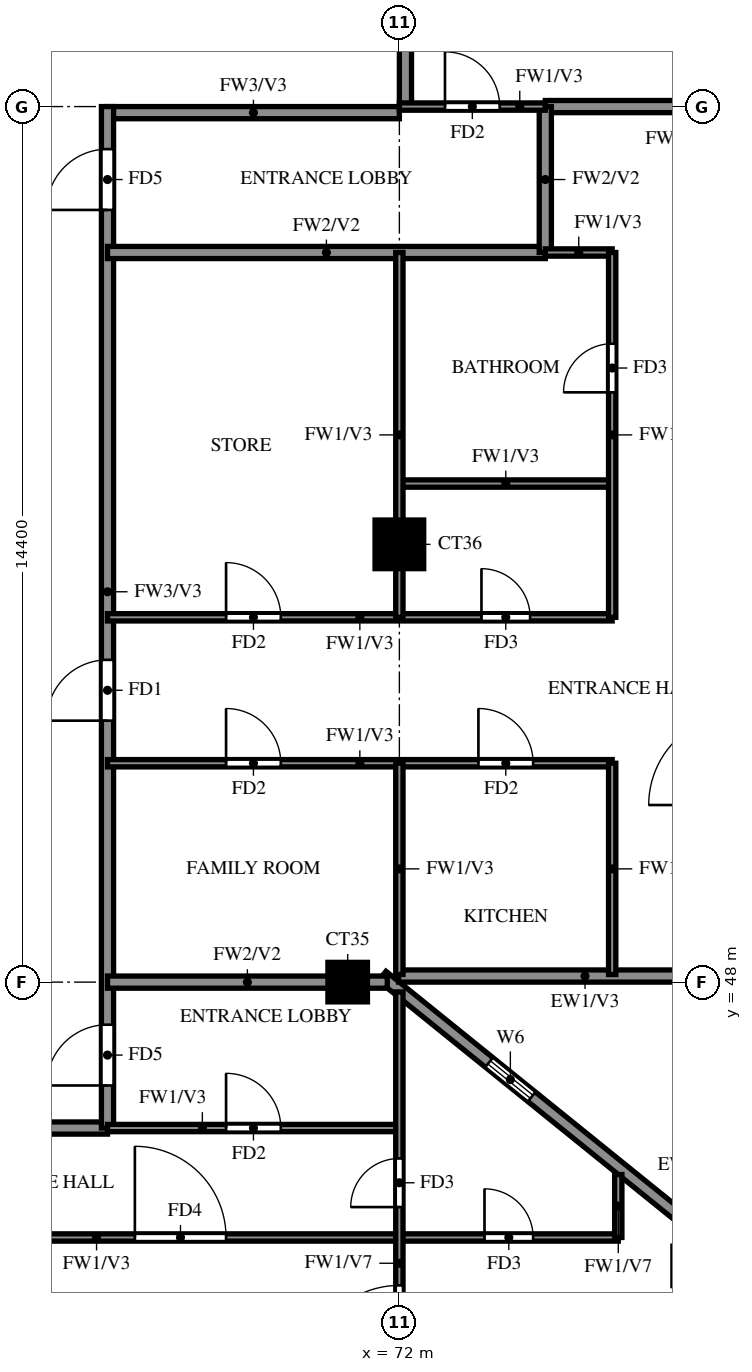
"""IFC4 building model, lengths in metres.
Left out: names, types, materials, properties, quantities, classifications, styles, units other than length and angle.
Written with IfcOpenShell. Run it as: python <this file> out.ifc"""

import sys

from ifc_helpers import new_model, si_unit, direction, frame, frame_2d, origin, origin_2d, place, context, subcontext, project, spatial, rectangle, extrude, source, transform, mapped, element, fill, save


model = new_model("IFC4")
c1 = context("Model", 3, precision=1e-05, world=origin(), true_north=direction((0.0, 1.0)))
c2 = subcontext(c1, "Body", "Model", "MODEL_VIEW")
j1 = project(units=[si_unit("LENGTHUNIT", "METRE"), si_unit("PLANEANGLEUNIT", "RADIAN")], contexts=[c1])
p1 = place(None, origin())
s1 = spatial("IfcSite", under=j1, at=p1, CompositionType="ELEMENT")
p2 = place(p1, origin())
s2 = spatial("IfcBuilding", under=s1, at=p2, CompositionType="ELEMENT")
p3 = place(p2, frame((0.0, 0.0, 236.0)))
s3 = spatial("IfcBuildingStorey", under=s2, at=p3, CompositionType="ELEMENT", Elevation=236.0)
m1 = source(origin(), c2, "Body", "SweptSolid", [
    extrude(rectangle(XDim=0.65, YDim=0.65, at=origin_2d()), origin(), (0.0, 0.0, 1.0), 3.22),
])
for number, where, z_axis, x_axis in (
    (1, (76.823, 43.333, 0.0), (0.0, 0.0, 1.0), (1.0, 0.0, 0.0)),
    (2, (71.15, 48.0, 0.0), (0.0, 0.0, 1.0), (1.0, 0.0, 0.0)),
):
    element("IfcColumn", number, at=place(p3, frame(where, z_axis=z_axis, x_axis=x_axis)), inside=s3, PredefinedType="COLUMN", context=c2, shape_type="MappedRepresentation", body=[
        mapped(m1, transform((0.0, 0.0, 0.0))),
    ])
m2 = source(origin(), c2, "Body", "SweptSolid", [
    extrude(rectangle(XDim=0.8, YDim=0.8, at=origin_2d()), origin(), (0.0, 0.0, 1.0), 3.22),
])
p4 = place(p3, frame((72.0, 55.2, 0.0), z_axis=(0.0, 0.0, 1.0), x_axis=(1.0, 0.0, 0.0)))
e3 = element("IfcColumn", 3, at=p4, inside=s3, PredefinedType="COLUMN", context=c2, shape_type="MappedRepresentation", body=[
    mapped(m2, transform((0.0, 0.0, 0.0))),
])
p5 = place(p3, frame((81.907, 39.87, 0.0), z_axis=(0.0, 0.0, 1.0), x_axis=(-0.777936274417, 0.62834318087, 0.0)))
e4 = element("IfcWall", 4, at=p5, inside=s3, PredefinedType="SOLIDWALL", context=c2, shape_type="SweptSolid", body=[
    extrude(rectangle(XDim=13.099, YDim=0.2, at=frame_2d((6.549, 0.0))), origin(), (0.0, 0.0, 1.0), 3.22),
])
p6 = place(p5, frame((9.938, 0.0, 1.5)))
e5 = element("IfcOpeningElement", 5, at=p6, cuts=e4, PredefinedType="OPENING", context=c2, shape_type="SweptSolid", body=[
    extrude(rectangle(XDim=0.9, YDim=0.9, at=frame_2d((0.45, 0.45))), frame((0.0, 0.11, 0.0), z_axis=(0.0, -1.0, 0.0), x_axis=(1.0, 0.0, 0.0)), (0.0, 0.0, 1.0), 0.22),
])
p7 = place(p3, frame((71.987, 48.1, 0.0), z_axis=(0.0, 0.0, 1.0), x_axis=(1.0, 0.0, 0.0)))
e6 = element("IfcWall", 6, at=p7, inside=s3, PredefinedType="SOLIDWALL", context=c2, shape_type="SweptSolid", body=[
    extrude(rectangle(XDim=6.813, YDim=0.2, at=frame_2d((3.406, 0.0))), origin(), (0.0, 0.0, 1.0), 3.22),
])
p8 = place(p3, frame((60.0, 45.6, 0.0), z_axis=(0.0, 0.0, 1.0), x_axis=(1.0, 0.0, 0.0)))
e7 = element("IfcWall", 7, at=p8, inside=s3, PredefinedType="SOLIDWALL", context=c2, shape_type="SweptSolid", body=[
    extrude(rectangle(XDim=7.2, YDim=0.2, at=frame_2d((3.6, 0.0))), origin(), (0.0, 0.0, 1.0), 3.22),
])
p9 = place(p3, frame((67.2, 62.3, 0.0), z_axis=(0.0, 0.0, 1.0), x_axis=(1.0, 0.0, 0.0)))
e8 = element("IfcWall", 8, at=p9, inside=s3, PredefinedType="SOLIDWALL", context=c2, shape_type="SweptSolid", body=[
    extrude(rectangle(XDim=4.8, YDim=0.2, at=frame_2d((2.4, 0.0))), origin(), (0.0, 0.0, 1.0), 3.22),
])
p10 = place(p3, frame((67.2, 45.6, 0.0), z_axis=(0.0, 0.0, 1.0), x_axis=(0.0, 1.0, 0.0)))
e9 = element("IfcWall", 9, at=p10, inside=s3, PredefinedType="SOLIDWALL", context=c2, shape_type="SweptSolid", body=[
    extrude(rectangle(XDim=16.8, YDim=0.2, at=frame_2d((8.4, 0.0))), origin(), (0.0, 0.0, 1.0), 3.22),
])
p11 = place(p10, frame((6.7, 0.0, 0.0)))
e10 = element("IfcOpeningElement", 10, at=p11, cuts=e9, PredefinedType="OPENING", context=c2, shape_type="SweptSolid", body=[
    extrude(rectangle(XDim=1.0, YDim=2.1, at=frame_2d((0.5, 1.05))), frame((0.0, 0.11, 0.0), z_axis=(0.0, -1.0, 0.0), x_axis=(1.0, 0.0, 0.0)), (0.0, 0.0, 1.0), 0.22),
])
p12 = place(p10, frame((15.1, 0.0, 0.0)))
e11 = element("IfcOpeningElement", 11, at=p12, cuts=e9, PredefinedType="OPENING", context=c2, shape_type="SweptSolid", body=[
    extrude(rectangle(XDim=1.0, YDim=2.1, at=frame_2d((0.5, 1.05))), frame((0.0, 0.11, 0.0), z_axis=(0.0, -1.0, 0.0), x_axis=(1.0, 0.0, 0.0)), (0.0, 0.0, 1.0), 0.22),
])
p13 = place(p10, frame((0.7, 0.0, 0.0)))
e12 = element("IfcOpeningElement", 12, at=p13, cuts=e9, PredefinedType="OPENING", context=c2, shape_type="SweptSolid", body=[
    extrude(rectangle(XDim=1.0, YDim=2.1, at=frame_2d((0.5, 1.05))), frame((0.0, 0.11, 0.0), z_axis=(0.0, -1.0, 0.0), x_axis=(1.0, 0.0, 0.0)), (0.0, 0.0, 1.0), 0.22),
])
p14 = place(p3, frame((72.1, 62.4, 0.0), z_axis=(0.0, 0.0, 1.0), x_axis=(0.0, 1.0, 0.0)))
e13 = element("IfcWall", 13, at=p14, inside=s3, PredefinedType="SOLIDWALL", context=c2, shape_type="SweptSolid", body=[
    extrude(rectangle(XDim=15.6, YDim=0.2, at=frame_2d((7.8, 0.0))), origin(), (0.0, 0.0, 1.0), 3.22),
])
p15 = place(p3, frame((67.2, 48.0, 0.0), z_axis=(0.0, 0.0, 1.0), x_axis=(1.0, 0.0, 0.0)))
e14 = element("IfcWall", 14, at=p15, inside=s3, PredefinedType="SOLIDWALL", context=c2, shape_type="SweptSolid", body=[
    extrude(rectangle(XDim=4.601, YDim=0.2, at=frame_2d((2.301, 0.0))), origin(), (0.0, 0.0, 1.0), 3.22),
])
p16 = place(p3, frame((67.2, 60.0, 0.0), z_axis=(0.0, 0.0, 1.0), x_axis=(1.0, 0.0, 0.0)))
e15 = element("IfcWall", 15, at=p16, inside=s3, PredefinedType="SOLIDWALL", context=c2, shape_type="SweptSolid", body=[
    extrude(rectangle(XDim=7.2, YDim=0.2, at=frame_2d((3.6, 0.0))), origin(), (0.0, 0.0, 1.0), 3.22),
])
p17 = place(p3, frame((74.4, 62.4, 0.0), z_axis=(0.0, 0.0, 1.0), x_axis=(1.0, 0.0, 0.0)))
e16 = element("IfcWall", 16, at=p17, inside=s3, PredefinedType="SOLIDWALL", context=c2, shape_type="SweptSolid", body=[
    extrude(rectangle(XDim=7.875, YDim=0.2, at=frame_2d((3.938, 0.0))), origin(), (0.0, 0.0, 1.0), 3.22),
])
p18 = place(p3, frame((74.4, 60.0, 0.0), z_axis=(0.0, 0.0, 1.0), x_axis=(0.0, 1.0, 0.0)))
e17 = element("IfcWall", 17, at=p18, inside=s3, PredefinedType="SOLIDWALL", context=c2, shape_type="SweptSolid", body=[
    extrude(rectangle(XDim=2.4, YDim=0.2, at=frame_2d((1.2, 0.0))), origin(), (0.0, 0.0, 1.0), 3.22),
])
p19 = place(p3, frame((60.0, 43.8, 0.0), z_axis=(0.0, 0.0, 1.0), x_axis=(1.0, 0.0, 0.0)))
e18 = element("IfcWall", 18, at=p19, inside=s3, PredefinedType="PARTITIONING", context=c2, shape_type="SweptSolid", body=[
    extrude(rectangle(XDim=15.6, YDim=0.12, at=frame_2d((7.8, 0.0))), origin(), (0.0, 0.0, 1.0), 3.22),
])
p20 = place(p19, frame((7.65, 0.0, 0.0)))
e19 = element("IfcOpeningElement", 19, at=p20, cuts=e18, PredefinedType="OPENING", context=c2, shape_type="SweptSolid", body=[
    extrude(rectangle(XDim=1.5, YDim=2.1, at=frame_2d((0.75, 1.05))), frame((0.0, 0.07, 0.0), z_axis=(0.0, -1.0, 0.0), x_axis=(1.0, 0.0, 0.0)), (0.0, 0.0, 1.0), 0.14),
])
p21 = place(p19, frame((1.95, 0.0, 0.0)))
e20 = element("IfcOpeningElement", 20, at=p21, cuts=e18, PredefinedType="OPENING", context=c2, shape_type="SweptSolid", body=[
    extrude(rectangle(XDim=0.9, YDim=2.1, at=frame_2d((0.45, 1.05))), frame((0.0, 0.07, 0.0), z_axis=(0.0, -1.0, 0.0), x_axis=(1.0, 0.0, 0.0)), (0.0, 0.0, 1.0), 0.14),
])
p22 = place(p19, frame((13.4, 0.0, 0.0)))
e21 = element("IfcOpeningElement", 21, at=p22, cuts=e18, PredefinedType="OPENING", context=c2, shape_type="SweptSolid", body=[
    extrude(rectangle(XDim=0.8, YDim=2.1, at=frame_2d((0.4, 1.05))), frame((0.0, 0.07, 0.0), z_axis=(0.0, -1.0, 0.0), x_axis=(1.0, 0.0, 0.0)), (0.0, 0.0, 1.0), 0.14),
])
p23 = place(p3, frame((67.2, 45.6, 0.0), z_axis=(0.0, 0.0, 1.0), x_axis=(1.0, 0.0, 0.0)))
e22 = element("IfcWall", 22, at=p23, inside=s3, PredefinedType="PARTITIONING", context=c2, shape_type="SweptSolid", body=[
    extrude(rectangle(XDim=4.8, YDim=0.12, at=frame_2d((2.4, 0.0))), origin(), (0.0, 0.0, 1.0), 3.22),
])
p24 = place(p23, frame((1.95, 0.0, 0.0)))
e23 = element("IfcOpeningElement", 23, at=p24, cuts=e22, PredefinedType="OPENING", context=c2, shape_type="SweptSolid", body=[
    extrude(rectangle(XDim=0.9, YDim=2.1, at=frame_2d((0.45, 1.05))), frame((0.0, 0.07, 0.0), z_axis=(0.0, -1.0, 0.0), x_axis=(1.0, 0.0, 0.0)), (0.0, 0.0, 1.0), 0.14),
])
p25 = place(p3, frame((67.2, 51.6, 0.0), z_axis=(0.0, 0.0, 1.0), x_axis=(1.0, 0.0, 0.0)))
e24 = element("IfcWall", 24, at=p25, inside=s3, PredefinedType="PARTITIONING", context=c2, shape_type="SweptSolid", body=[
    extrude(rectangle(XDim=8.3, YDim=0.12, at=frame_2d((4.15, 0.0))), origin(), (0.0, 0.0, 1.0), 3.22),
])
p26 = place(p25, frame((6.1, 0.0, 0.0)))
e25 = element("IfcOpeningElement", 25, at=p26, cuts=e24, PredefinedType="OPENING", context=c2, shape_type="SweptSolid", body=[
    extrude(rectangle(XDim=0.9, YDim=2.1, at=frame_2d((0.45, 1.05))), frame((0.0, 0.07, 0.0), z_axis=(0.0, -1.0, 0.0), x_axis=(1.0, 0.0, 0.0)), (0.0, 0.0, 1.0), 0.14),
])
p27 = place(p25, frame((1.95, 0.0, 0.0)))
e26 = element("IfcOpeningElement", 26, at=p27, cuts=e24, PredefinedType="OPENING", context=c2, shape_type="SweptSolid", body=[
    extrude(rectangle(XDim=0.9, YDim=2.1, at=frame_2d((0.45, 1.05))), frame((0.0, 0.07, 0.0), z_axis=(0.0, -1.0, 0.0), x_axis=(1.0, 0.0, 0.0)), (0.0, 0.0, 1.0), 0.14),
])
p28 = place(p3, frame((67.2, 54.0, 0.0), z_axis=(0.0, 0.0, 1.0), x_axis=(1.0, 0.0, 0.0)))
e27 = element("IfcWall", 27, at=p28, inside=s3, PredefinedType="PARTITIONING", context=c2, shape_type="SweptSolid", body=[
    extrude(rectangle(XDim=8.3, YDim=0.12, at=frame_2d((4.15, 0.0))), origin(), (0.0, 0.0, 1.0), 3.22),
])
p29 = place(p28, frame((6.15, 0.0, 0.0)))
e28 = element("IfcOpeningElement", 28, at=p29, cuts=e27, PredefinedType="OPENING", context=c2, shape_type="SweptSolid", body=[
    extrude(rectangle(XDim=0.8, YDim=2.1, at=frame_2d((0.4, 1.05))), frame((0.0, 0.07, 0.0), z_axis=(0.0, -1.0, 0.0), x_axis=(1.0, 0.0, 0.0)), (0.0, 0.0, 1.0), 0.14),
])
p30 = place(p28, frame((1.95, 0.0, 0.0)))
e29 = element("IfcOpeningElement", 29, at=p30, cuts=e27, PredefinedType="OPENING", context=c2, shape_type="SweptSolid", body=[
    extrude(rectangle(XDim=0.9, YDim=2.1, at=frame_2d((0.45, 1.05))), frame((0.0, 0.07, 0.0), z_axis=(0.0, -1.0, 0.0), x_axis=(1.0, 0.0, 0.0)), (0.0, 0.0, 1.0), 0.14),
])
p31 = place(p3, frame((72.0, 56.2, 0.0), z_axis=(0.0, 0.0, 1.0), x_axis=(1.0, 0.0, 0.0)))
e30 = element("IfcWall", 30, at=p31, inside=s3, PredefinedType="PARTITIONING", context=c2, shape_type="SweptSolid", body=[
    extrude(rectangle(XDim=3.5, YDim=0.12, at=frame_2d((1.75, 0.0))), origin(), (0.0, 0.0, 1.0), 3.22),
])
p32 = place(p3, frame((74.4, 60.0, 0.0), z_axis=(0.0, 0.0, 1.0), x_axis=(1.0, 0.0, 0.0)))
e31 = element("IfcWall", 31, at=p32, inside=s3, PredefinedType="PARTITIONING", context=c2, shape_type="SweptSolid", body=[
    extrude(rectangle(XDim=1.1, YDim=0.12, at=frame_2d((0.55, 0.0))), origin(), (0.0, 0.0, 1.0), 3.22),
])
p33 = place(p3, frame((72.0, 62.4, 0.0), z_axis=(0.0, 0.0, 1.0), x_axis=(1.0, 0.0, 0.0)))
e32 = element("IfcWall", 32, at=p33, inside=s3, PredefinedType="PARTITIONING", context=c2, shape_type="SweptSolid", body=[
    extrude(rectangle(XDim=2.4, YDim=0.12, at=frame_2d((1.2, 0.0))), origin(), (0.0, 0.0, 1.0), 3.22),
])
p34 = place(p33, frame((0.75, 0.0, 0.0)))
e33 = element("IfcOpeningElement", 33, at=p34, cuts=e32, PredefinedType="OPENING", context=c2, shape_type="SweptSolid", body=[
    extrude(rectangle(XDim=0.9, YDim=2.1, at=frame_2d((0.45, 1.05))), frame((0.0, 0.07, 0.0), z_axis=(0.0, -1.0, 0.0), x_axis=(1.0, 0.0, 0.0)), (0.0, 0.0, 1.0), 0.14),
])
p35 = place(p3, frame((72.0, 39.725, 0.0), z_axis=(0.0, 0.0, 1.0), x_axis=(0.0, 1.0, 0.0)))
e34 = element("IfcWall", 34, at=p35, inside=s3, PredefinedType="PARTITIONING", context=c2, shape_type="SweptSolid", body=[
    extrude(rectangle(XDim=8.114, YDim=0.12, at=frame_2d((4.057, 0.0))), origin(), (0.0, 0.0, 1.0), 2.32),
])
p36 = place(p35, frame((1.788, 0.0, 0.0)))
e35 = element("IfcOpeningElement", 35, at=p36, cuts=e34, PredefinedType="OPENING", context=c2, shape_type="SweptSolid", body=[
    extrude(rectangle(XDim=1.5, YDim=2.1, at=frame_2d((0.75, 1.05))), frame((0.0, 0.07, 0.0), z_axis=(0.0, -1.0, 0.0), x_axis=(1.0, 0.0, 0.0)), (0.0, 0.0, 1.0), 0.14),
])
p37 = place(p35, frame((4.575, 0.0, 0.0)))
e36 = element("IfcOpeningElement", 36, at=p37, cuts=e34, PredefinedType="OPENING", context=c2, shape_type="SweptSolid", body=[
    extrude(rectangle(XDim=0.8, YDim=2.1, at=frame_2d((0.4, 1.05))), frame((0.0, 0.07, 0.0), z_axis=(0.0, -1.0, 0.0), x_axis=(1.0, 0.0, 0.0)), (0.0, 0.0, 1.0), 0.14),
])
p38 = place(p3, frame((72.0, 48.125, 0.0), z_axis=(0.0, 0.0, 1.0), x_axis=(0.0, 1.0, 0.0)))
e37 = element("IfcWall", 37, at=p38, inside=s3, PredefinedType="PARTITIONING", context=c2, shape_type="SweptSolid", body=[
    extrude(rectangle(XDim=3.475, YDim=0.12, at=frame_2d((1.738, 0.0))), origin(), (0.0, 0.0, 1.0), 3.22),
])
p39 = place(p3, frame((72.0, 54.0, 0.0), z_axis=(0.0, 0.0, 1.0), x_axis=(0.0, 1.0, 0.0)))
e38 = element("IfcWall", 38, at=p39, inside=s3, PredefinedType="PARTITIONING", context=c2, shape_type="SweptSolid", body=[
    extrude(rectangle(XDim=6.0, YDim=0.12, at=frame_2d((3.0, 0.0))), origin(), (0.0, 0.0, 1.0), 3.22),
])
p40 = place(p3, frame((75.5, 48.125, 0.0), z_axis=(0.0, 0.0, 1.0), x_axis=(0.0, 1.0, 0.0)))
e39 = element("IfcWall", 39, at=p40, inside=s3, PredefinedType="PARTITIONING", context=c2, shape_type="SweptSolid", body=[
    extrude(rectangle(XDim=3.475, YDim=0.12, at=frame_2d((1.738, 0.0))), origin(), (0.0, 0.0, 1.0), 3.22),
])
p41 = place(p3, frame((75.5, 54.0, 0.0), z_axis=(0.0, 0.0, 1.0), x_axis=(0.0, 1.0, 0.0)))
e40 = element("IfcWall", 40, at=p41, inside=s3, PredefinedType="PARTITIONING", context=c2, shape_type="SweptSolid", body=[
    extrude(rectangle(XDim=6.0, YDim=0.12, at=frame_2d((3.0, 0.0))), origin(), (0.0, 0.0, 1.0), 3.22),
])
p42 = place(p41, frame((3.7, 0.0, 0.0)))
e41 = element("IfcOpeningElement", 41, at=p42, cuts=e40, PredefinedType="OPENING", context=c2, shape_type="SweptSolid", body=[
    extrude(rectangle(XDim=0.8, YDim=2.1, at=frame_2d((0.4, 1.05))), frame((0.0, 0.07, 0.0), z_axis=(0.0, -1.0, 0.0), x_axis=(1.0, 0.0, 0.0)), (0.0, 0.0, 1.0), 0.14),
])
p43 = place(p3, frame((75.6, 43.8, 0.0), z_axis=(0.0, 0.0, 1.0), x_axis=(0.0, 1.0, 0.0)))
e42 = element("IfcWall", 42, at=p43, inside=s3, PredefinedType="PARTITIONING", context=c2, shape_type="SweptSolid", body=[
    extrude(rectangle(XDim=1.035, YDim=0.12, at=frame_2d((0.518, 0.0))), origin(), (0.0, 0.0, 1.0), 2.32),
])
p44 = place(p6, origin())
e43 = element("IfcWindow", 43, at=p44, inside=s3, PartitioningType="SINGLE_PANEL", PredefinedType="WINDOW", context=c2, shape_type="SweptSolid", body=[
    extrude(rectangle(XDim=0.9, YDim=0.9, at=frame_2d((0.45, 0.45))), frame((0.0, 0.03, 0.0), z_axis=(0.0, -1.0, 0.0), x_axis=(1.0, 0.0, 0.0)), (0.0, 0.0, 1.0), 0.06),
])
fill(e5, e43)
p45 = place(p11, origin())
e44 = element("IfcDoor", 44, at=p45, inside=s3, OperationType="SINGLE_SWING_LEFT", PredefinedType="DOOR", context=c2, shape_type="SweptSolid", body=[
    extrude(rectangle(XDim=1.0, YDim=2.1, at=frame_2d((0.5, 1.05))), frame((0.0, 0.025, 0.0), z_axis=(0.0, -1.0, 0.0), x_axis=(1.0, 0.0, 0.0)), (0.0, 0.0, 1.0), 0.05),
])
fill(e10, e44)
p46 = place(p26, origin())
e45 = element("IfcDoor", 45, at=p46, inside=s3, OperationType="SINGLE_SWING_LEFT", PredefinedType="DOOR", context=c2, shape_type="SweptSolid", body=[
    extrude(rectangle(XDim=0.9, YDim=2.1, at=frame_2d((0.45, 1.05))), frame((0.0, 0.025, 0.0), z_axis=(0.0, -1.0, 0.0), x_axis=(1.0, 0.0, 0.0)), (0.0, 0.0, 1.0), 0.05),
])
fill(e25, e45)
p47 = place(p29, origin())
e46 = element("IfcDoor", 46, at=p47, inside=s3, OperationType="SINGLE_SWING_RIGHT", PredefinedType="DOOR", context=c2, shape_type="SweptSolid", body=[
    extrude(rectangle(XDim=0.8, YDim=2.1, at=frame_2d((0.4, 1.05))), frame((0.0, 0.025, 0.0), z_axis=(0.0, -1.0, 0.0), x_axis=(1.0, 0.0, 0.0)), (0.0, 0.0, 1.0), 0.05),
])
fill(e28, e46)
p48 = place(p42, origin())
e47 = element("IfcDoor", 47, at=p48, inside=s3, OperationType="SINGLE_SWING_LEFT", PredefinedType="DOOR", context=c2, shape_type="SweptSolid", body=[
    extrude(rectangle(XDim=0.8, YDim=2.1, at=frame_2d((0.4, 1.05))), frame((0.0, 0.025, 0.0), z_axis=(0.0, -1.0, 0.0), x_axis=(1.0, 0.0, 0.0)), (0.0, 0.0, 1.0), 0.05),
])
fill(e41, e47)
p49 = place(p27, origin())
e48 = element("IfcDoor", 48, at=p49, inside=s3, OperationType="SINGLE_SWING_LEFT", PredefinedType="DOOR", context=c2, shape_type="SweptSolid", body=[
    extrude(rectangle(XDim=0.9, YDim=2.1, at=frame_2d((0.45, 1.05))), frame((0.0, 0.025, 0.0), z_axis=(0.0, -1.0, 0.0), x_axis=(1.0, 0.0, 0.0)), (0.0, 0.0, 1.0), 0.05),
])
fill(e26, e48)
p50 = place(p30, origin())
e49 = element("IfcDoor", 49, at=p50, inside=s3, OperationType="SINGLE_SWING_RIGHT", PredefinedType="DOOR", context=c2, shape_type="SweptSolid", body=[
    extrude(rectangle(XDim=0.9, YDim=2.1, at=frame_2d((0.45, 1.05))), frame((0.0, 0.025, 0.0), z_axis=(0.0, -1.0, 0.0), x_axis=(1.0, 0.0, 0.0)), (0.0, 0.0, 1.0), 0.05),
])
fill(e29, e49)
p51 = place(p34, origin())
e50 = element("IfcDoor", 50, at=p51, inside=s3, OperationType="SINGLE_SWING_LEFT", PredefinedType="DOOR", context=c2, shape_type="SweptSolid", body=[
    extrude(rectangle(XDim=0.9, YDim=2.1, at=frame_2d((0.45, 1.05))), frame((0.0, 0.025, 0.0), z_axis=(0.0, -1.0, 0.0), x_axis=(1.0, 0.0, 0.0)), (0.0, 0.0, 1.0), 0.05),
])
fill(e33, e50)
p52 = place(p12, origin())
e51 = element("IfcDoor", 51, at=p52, inside=s3, OperationType="SINGLE_SWING_RIGHT", PredefinedType="DOOR", context=c2, shape_type="SweptSolid", body=[
    extrude(rectangle(XDim=1.0, YDim=2.1, at=frame_2d((0.5, 1.05))), frame((0.0, 0.025, 0.0), z_axis=(0.0, -1.0, 0.0), x_axis=(1.0, 0.0, 0.0)), (0.0, 0.0, 1.0), 0.05),
])
fill(e11, e51)
p53 = place(p24, origin())
e52 = element("IfcDoor", 52, at=p53, inside=s3, OperationType="SINGLE_SWING_LEFT", PredefinedType="DOOR", context=c2, shape_type="SweptSolid", body=[
    extrude(rectangle(XDim=0.9, YDim=2.1, at=frame_2d((0.45, 1.05))), frame((0.0, 0.025, 0.0), z_axis=(0.0, -1.0, 0.0), x_axis=(1.0, 0.0, 0.0)), (0.0, 0.0, 1.0), 0.05),
])
fill(e23, e52)
p54 = place(p13, origin())
e53 = element("IfcDoor", 53, at=p54, inside=s3, OperationType="SINGLE_SWING_RIGHT", PredefinedType="DOOR", context=c2, shape_type="SweptSolid", body=[
    extrude(rectangle(XDim=1.0, YDim=2.1, at=frame_2d((0.5, 1.05))), frame((0.0, 0.025, 0.0), z_axis=(0.0, -1.0, 0.0), x_axis=(1.0, 0.0, 0.0)), (0.0, 0.0, 1.0), 0.05),
])
fill(e12, e53)
p55 = place(p20, origin())
e54 = element("IfcDoor", 54, at=p55, inside=s3, OperationType="SINGLE_SWING_LEFT", PredefinedType="DOOR", context=c2, shape_type="SweptSolid", body=[
    extrude(rectangle(XDim=1.5, YDim=2.1, at=frame_2d((0.75, 1.05))), frame((0.0, 0.025, 0.0), z_axis=(0.0, -1.0, 0.0), x_axis=(1.0, 0.0, 0.0)), (0.0, 0.0, 1.0), 0.05),
])
fill(e19, e54)
p56 = place(p36, origin())
e55 = element("IfcDoor", 55, at=p56, inside=s3, OperationType="SINGLE_SWING_LEFT", PredefinedType="DOOR", context=c2, shape_type="SweptSolid", body=[
    extrude(rectangle(XDim=1.5, YDim=2.1, at=frame_2d((0.75, 1.05))), frame((0.0, 0.025, 0.0), z_axis=(0.0, -1.0, 0.0), x_axis=(1.0, 0.0, 0.0)), (0.0, 0.0, 1.0), 0.05),
])
fill(e35, e55)
p57 = place(p37, origin())
e56 = element("IfcDoor", 56, at=p57, inside=s3, OperationType="SINGLE_SWING_LEFT", PredefinedType="DOOR", context=c2, shape_type="SweptSolid", body=[
    extrude(rectangle(XDim=0.8, YDim=2.1, at=frame_2d((0.4, 1.05))), frame((0.0, 0.025, 0.0), z_axis=(0.0, -1.0, 0.0), x_axis=(1.0, 0.0, 0.0)), (0.0, 0.0, 1.0), 0.05),
])
fill(e36, e56)
p58 = place(p22, origin())
e57 = element("IfcDoor", 57, at=p58, inside=s3, OperationType="SINGLE_SWING_LEFT", PredefinedType="DOOR", context=c2, shape_type="SweptSolid", body=[
    extrude(rectangle(XDim=0.8, YDim=2.1, at=frame_2d((0.4, 1.05))), frame((0.0, 0.025, 0.0), z_axis=(0.0, -1.0, 0.0), x_axis=(1.0, 0.0, 0.0)), (0.0, 0.0, 1.0), 0.05),
])
fill(e21, e57)
save(model, sys.argv[1])
